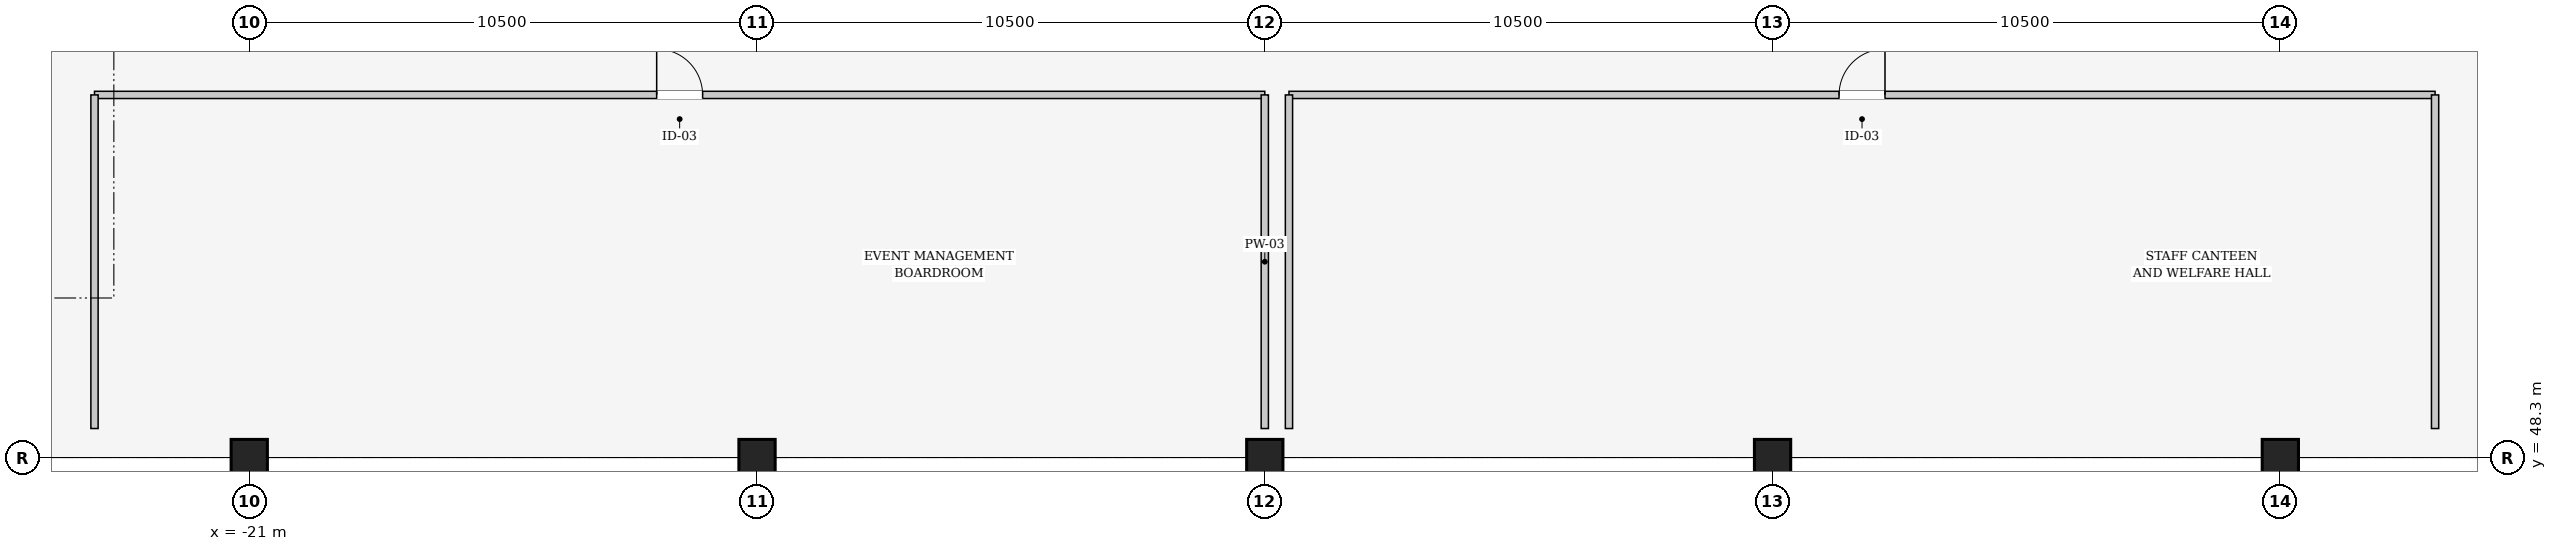
"""IFC4 building model, lengths in metres.
Left out: names, types, materials, properties, quantities, classifications, styles, units other than length and angle.
Written with IfcOpenShell. Run it as: python <this file> out.ifc"""

import sys

from ifc_helpers import new_model, si_unit, direction, frame, frame_2d, origin, origin_2d, place, context, subcontext, project, spatial, rectangle, extrude, element, fill, save


model = new_model("IFC4")
c1 = context("Model", 3, precision=1e-05, world=origin(), true_north=direction((0.0, 1.0)))
c2 = subcontext(c1, "Body", "Model", "MODEL_VIEW")
j1 = project(units=[si_unit("LENGTHUNIT", "METRE"), si_unit("PLANEANGLEUNIT", "RADIAN")], contexts=[c1])
p1 = place(None, origin())
s1 = spatial("IfcSite", under=j1, at=p1, CompositionType="ELEMENT")
p2 = place(p1, origin())
s2 = spatial("IfcBuilding", under=s1, at=p2, CompositionType="ELEMENT")
p3 = place(p2, frame((0.0, 0.0, 11.4)))
s3 = spatial("IfcBuildingStorey", under=s2, at=p3, CompositionType="ELEMENT", Elevation=11.4)
for number, where, z_axis, x_axis in (
    (1, (-21.0, 48.3, 0.0), (0.0, 0.0, 1.0), (1.0, 0.0, 0.0)),
    (2, (-10.5, 48.3, 0.0), (0.0, 0.0, 1.0), (1.0, 0.0, 0.0)),
    (3, (0.0, 48.3, 0.0), (0.0, 0.0, 1.0), (1.0, 0.0, 0.0)),
    (4, (10.5, 48.3, 0.0), (0.0, 0.0, 1.0), (1.0, 0.0, 0.0)),
    (5, (21.0, 48.3, 0.0), (0.0, 0.0, 1.0), (1.0, 0.0, 0.0)),
):
    element("IfcColumn", number, at=place(p3, frame(where, z_axis=z_axis, x_axis=x_axis)), inside=s3, PredefinedType="COLUMN", context=c2, shape_type="SweptSolid", body=[
        extrude(rectangle(XDim=0.75, YDim=0.75, at=origin_2d()), origin(), (0.0, 0.0, 1.0), 4.8),
    ])
p4 = place(p3, frame((-24.2, 55.8, 0.0), z_axis=(0.0, 0.0, 1.0), x_axis=(1.0, 0.0, 0.0)))
e6 = element("IfcWall", 6, at=p4, inside=s3, PredefinedType="PARTITIONING", context=c2, shape_type="SweptSolid", body=[
    extrude(rectangle(XDim=24.2, YDim=0.15, at=frame_2d((12.1, 0.0))), origin(), (0.0, 0.0, 1.0), 3.922),
])
p5 = place(p4, frame((11.625, 0.0, 0.0)))
e7 = element("IfcOpeningElement", 7, at=p5, cuts=e6, PredefinedType="OPENING", context=c2, shape_type="SweptSolid", body=[
    extrude(rectangle(XDim=0.95, YDim=2.15, at=frame_2d((0.475, 1.075))), frame((0.0, 0.085, 0.0), z_axis=(0.0, -1.0, 0.0), x_axis=(1.0, 0.0, 0.0)), (0.0, 0.0, 1.0), 0.17),
])
p6 = place(p3, frame((0.0, 55.8, 0.0), z_axis=(0.0, 0.0, 1.0), x_axis=(0.0, -1.0, 0.0)))
e8 = element("IfcWall", 8, at=p6, inside=s3, PredefinedType="PARTITIONING", context=c2, shape_type="SweptSolid", body=[
    extrude(rectangle(XDim=6.9, YDim=0.15, at=frame_2d((3.45, 0.0))), origin(), (0.0, 0.0, 1.0), 3.922),
])
p7 = place(p3, frame((-24.2, 48.9, 0.0), z_axis=(0.0, 0.0, 1.0), x_axis=(0.0, 1.0, 0.0)))
e9 = element("IfcWall", 9, at=p7, inside=s3, PredefinedType="PARTITIONING", context=c2, shape_type="SweptSolid", body=[
    extrude(rectangle(XDim=6.9, YDim=0.15, at=frame_2d((3.45, 0.0))), origin(), (0.0, 0.0, 1.0), 4.44),
])
p8 = place(p3, frame((0.5, 55.8, 0.0), z_axis=(0.0, 0.0, 1.0), x_axis=(1.0, 0.0, 0.0)))
e10 = element("IfcWall", 10, at=p8, inside=s3, PredefinedType="PARTITIONING", context=c2, shape_type="SweptSolid", body=[
    extrude(rectangle(XDim=23.7, YDim=0.15, at=frame_2d((11.85, 0.0))), origin(), (0.0, 0.0, 1.0), 3.922),
])
p9 = place(p8, frame((11.375, 0.0, 0.0)))
e11 = element("IfcOpeningElement", 11, at=p9, cuts=e10, PredefinedType="OPENING", context=c2, shape_type="SweptSolid", body=[
    extrude(rectangle(XDim=0.95, YDim=2.15, at=frame_2d((0.475, 1.075))), frame((0.0, 0.085, 0.0), z_axis=(0.0, -1.0, 0.0), x_axis=(1.0, 0.0, 0.0)), (0.0, 0.0, 1.0), 0.17),
])
p10 = place(p3, frame((24.2, 55.8, 0.0), z_axis=(0.0, 0.0, 1.0), x_axis=(0.0, -1.0, 0.0)))
e12 = element("IfcWall", 12, at=p10, inside=s3, PredefinedType="PARTITIONING", context=c2, shape_type="SweptSolid", body=[
    extrude(rectangle(XDim=6.9, YDim=0.15, at=frame_2d((3.45, 0.0))), origin(), (0.0, 0.0, 1.0), 4.44),
])
p11 = place(p3, frame((0.5, 48.9, 0.0), z_axis=(0.0, 0.0, 1.0), x_axis=(0.0, 1.0, 0.0)))
e13 = element("IfcWall", 13, at=p11, inside=s3, PredefinedType="PARTITIONING", context=c2, shape_type="SweptSolid", body=[
    extrude(rectangle(XDim=6.9, YDim=0.15, at=frame_2d((3.45, 0.0))), origin(), (0.0, 0.0, 1.0), 4.1),
])
p12 = place(p5, origin())
e14 = element("IfcDoor", 14, at=p12, inside=s3, OperationType="SINGLE_SWING_LEFT", PredefinedType="DOOR", context=c2, shape_type="SweptSolid", body=[
    extrude(rectangle(XDim=0.95, YDim=2.15, at=frame_2d((0.475, 1.075))), frame((0.0, 0.025, 0.0), z_axis=(0.0, -1.0, 0.0), x_axis=(1.0, 0.0, 0.0)), (0.0, 0.0, 1.0), 0.05),
])
fill(e7, e14)
p13 = place(p9, origin())
e15 = element("IfcDoor", 15, at=p13, inside=s3, OperationType="SINGLE_SWING_RIGHT", PredefinedType="DOOR", context=c2, shape_type="SweptSolid", body=[
    extrude(rectangle(XDim=0.95, YDim=2.15, at=frame_2d((0.475, 1.075))), frame((0.0, 0.025, 0.0), z_axis=(0.0, -1.0, 0.0), x_axis=(1.0, 0.0, 0.0)), (0.0, 0.0, 1.0), 0.05),
])
fill(e11, e15)
save(model, sys.argv[1])
